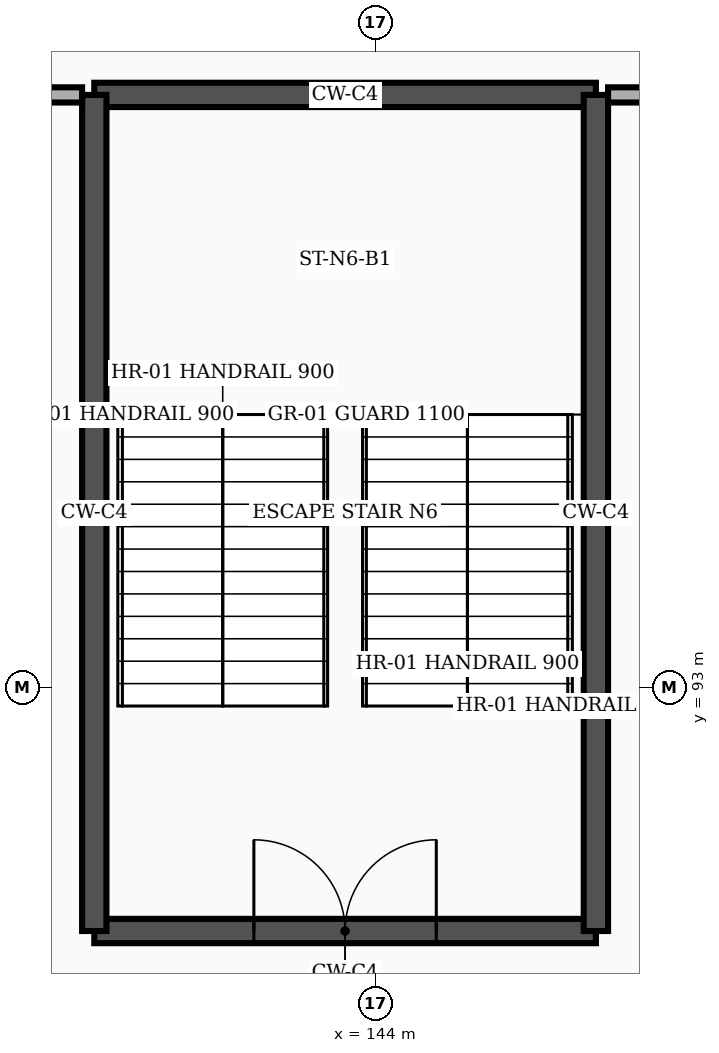
"""IFC4 building model, lengths in metres.
Left out: names, types, materials, properties, quantities, classifications, styles, units other than length and angle.
Written with IfcOpenShell. Run it as: python <this file> out.ifc"""

import sys

from ifc_helpers import new_model, si_unit, direction, frame, frame_2d, origin, place, context, subcontext, project, spatial, rectangle, extrude, element, fill, save


model = new_model("IFC4")
c1 = context("Model", 3, precision=1e-05, world=origin(), true_north=direction((0.0, 1.0)))
c2 = subcontext(c1, "Body", "Model", "MODEL_VIEW")
j1 = project(units=[si_unit("LENGTHUNIT", "METRE"), si_unit("PLANEANGLEUNIT", "RADIAN")], contexts=[c1])
p1 = place(None, origin())
s1 = spatial("IfcSite", under=j1, at=p1, CompositionType="ELEMENT")
p2 = place(p1, origin())
s2 = spatial("IfcBuilding", under=s1, at=p2, CompositionType="ELEMENT")
p3 = place(p2, frame((0.0, 0.0, -4.5)))
s3 = spatial("IfcBuildingStorey", under=s2, at=p3, CompositionType="ELEMENT", Elevation=-4.5)
p4 = place(p3, frame((140.3, 89.8, 0.0), z_axis=(0.0, 0.0, 1.0), x_axis=(1.0, 0.0, 0.0)))
e1 = element("IfcWall", 1, at=p4, inside=s3, PredefinedType="SHEAR", context=c2, shape_type="SweptSolid", body=[
    extrude(rectangle(XDim=6.6, YDim=0.32, at=frame_2d((3.3, 0.0))), origin(), (0.0, 0.0, 1.0), 4.24),
])
p5 = place(p4, frame((2.1, 0.0, 0.0)))
e2 = element("IfcOpeningElement", 2, at=p5, cuts=e1, PredefinedType="OPENING", context=c2, shape_type="SweptSolid", body=[
    extrude(rectangle(XDim=2.4, YDim=2.25, at=frame_2d((1.2, 1.125))), frame((0.0, 0.172, 0.0), z_axis=(0.0, -1.0, 0.0), x_axis=(1.0, 0.0, 0.0)), (0.0, 0.0, 1.0), 0.344),
])
p6 = place(p3, frame((140.3, 100.8, 0.0), z_axis=(0.0, 0.0, 1.0), x_axis=(1.0, 0.0, 0.0)))
e3 = element("IfcWall", 3, at=p6, inside=s3, PredefinedType="SHEAR", context=c2, shape_type="SweptSolid", body=[
    extrude(rectangle(XDim=6.6, YDim=0.32, at=frame_2d((3.3, 0.0))), origin(), (0.0, 0.0, 1.0), 4.24),
])
for number, where, z_axis, x_axis in (
    (4, (140.3, 89.8, 0.0), (0.0, 0.0, 1.0), (0.0, 1.0, 0.0)),
    (5, (146.9, 89.8, 0.0), (0.0, 0.0, 1.0), (0.0, 1.0, 0.0)),
):
    element("IfcWall", number, at=place(p3, frame(where, z_axis=z_axis, x_axis=x_axis)), inside=s3, PredefinedType="SHEAR", context=c2, shape_type="SweptSolid", body=[
        extrude(rectangle(XDim=11.0, YDim=0.32, at=frame_2d((5.5, 0.0))), origin(), (0.0, 0.0, 1.0), 4.24),
    ])
p7 = place(p3, frame((133.8, 100.8, 0.0), z_axis=(0.0, 0.0, 1.0), x_axis=(1.0, 0.0, 0.0)))
e6 = element("IfcWall", 6, at=p7, inside=s3, PredefinedType="PARTITIONING", context=c2, shape_type="SweptSolid", body=[
    extrude(rectangle(XDim=6.34, YDim=0.2, at=frame_2d((3.17, 0.0))), origin(), (0.0, 0.0, 1.0), 4.24),
])
p8 = place(p3, frame((147.06, 100.8, 0.0), z_axis=(0.0, 0.0, 1.0), x_axis=(1.0, 0.0, 0.0)))
e7 = element("IfcWall", 7, at=p8, inside=s3, PredefinedType="PARTITIONING", context=c2, shape_type="SweptSolid", body=[
    extrude(rectangle(XDim=5.855, YDim=0.2, at=frame_2d((2.927, 0.0))), origin(), (0.0, 0.0, 1.0), 4.24),
])
p9 = place(p5, origin())
e8 = element("IfcDoor", 8, at=p9, inside=s3, OperationType="DOUBLE_DOOR_SINGLE_SWING", PredefinedType="DOOR", context=c2, shape_type="SweptSolid", body=[
    extrude(rectangle(XDim=2.4, YDim=2.25, at=frame_2d((1.2, 1.125))), frame((0.0, 0.025, 0.0), z_axis=(0.0, -1.0, 0.0), x_axis=(1.0, 0.0, 0.0)), (0.0, 0.0, 1.0), 0.05),
])
fill(e2, e8)
save(model, sys.argv[1])
